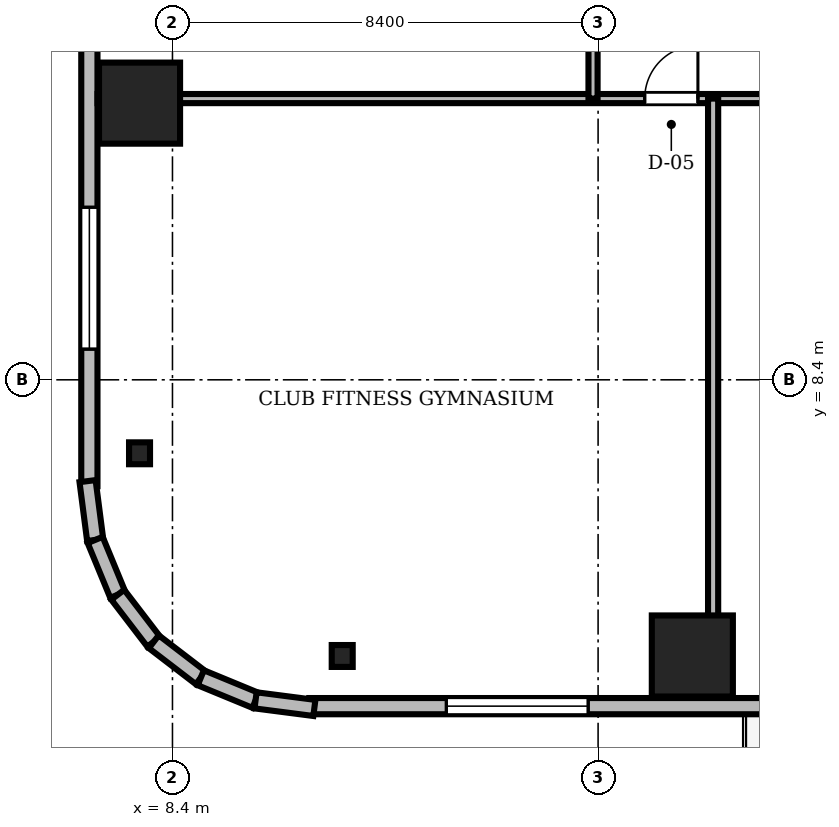
"""IFC4 building model, lengths in metres.
Left out: names, types, materials, properties, quantities, classifications, styles, units other than length and angle.
Written with IfcOpenShell. Run it as: python <this file> out.ifc"""

import sys

from ifc_helpers import new_model, si_unit, direction, frame, frame_2d, origin, origin_2d, place, context, subcontext, project, spatial, rectangle, i_section, extrude, source, transform, mapped, element, fill, save


model = new_model("IFC4")
c1 = context("Model", 3, precision=1e-05, world=origin(), true_north=direction((0.0, 1.0)))
c2 = subcontext(c1, "Body", "Model", "MODEL_VIEW")
j1 = project(units=[si_unit("LENGTHUNIT", "METRE"), si_unit("PLANEANGLEUNIT", "RADIAN")], contexts=[c1])
p1 = place(None, origin())
s1 = spatial("IfcSite", under=j1, at=p1, CompositionType="ELEMENT")
p2 = place(p1, origin())
s2 = spatial("IfcBuilding", under=s1, at=p2, CompositionType="ELEMENT")
p3 = place(p2, frame((0.0, 0.0, 155.7)))
s3 = spatial("IfcBuildingStorey", under=s2, at=p3, CompositionType="ELEMENT", Elevation=155.7)
m1 = source(origin(), c2, "Body", "SweptSolid", [
    extrude(rectangle(XDim=1.6, YDim=1.6, at=origin_2d()), origin(), (0.0, 0.0, 1.0), 3.46),
])
for number, where, z_axis, x_axis in (
    (1, (18.66, 2.95, 0.0), (0.0, 0.0, 1.0), (1.0, 0.0, 0.0)),
    (2, (7.75, 13.86, 0.0), (0.0, 0.0, 1.0), (1.0, 0.0, 0.0)),
):
    element("IfcColumn", number, at=place(p3, frame(where, z_axis=z_axis, x_axis=x_axis)), inside=s3, PredefinedType="COLUMN", context=c2, shape_type="MappedRepresentation", body=[
        mapped(m1, transform((0.0, 0.0, 0.0), scale=1.0)),
    ])
m2 = source(origin(), c2, "Body", "SweptSolid", [
    extrude(i_section(OverallWidth=0.414, OverallDepth=0.432, WebThickness=0.026, FlangeThickness=0.04, FilletRadius=0.015, at=origin_2d()), origin(), (0.0, 0.0, 1.0), 3.46),
])
for number, where, z_axis, x_axis in (
    (3, (11.75, 2.95, 0.0), (0.0, 0.0, 1.0), (1.0, 0.0, 0.0)),
    (4, (7.75, 6.95, 0.0), (0.0, 0.0, 1.0), (1.0, 0.0, 0.0)),
):
    element("IfcColumn", number, at=place(p3, frame(where, z_axis=z_axis, x_axis=x_axis)), inside=s3, PredefinedType="COLUMN", context=c2, shape_type="MappedRepresentation", body=[
        mapped(m2, transform((0.0, 0.0, 0.0), scale=1.0)),
    ])
m3 = source(origin(), c2, "Body", "SweptSolid", [
    extrude(rectangle(XDim=15.6, YDim=0.32, at=frame_2d((7.8, 0.0))), origin(), (0.0, 0.0, 1.0), 3.46),
])
p4 = place(p3, frame((11.1, 1.96, 0.0), z_axis=(0.0, 0.0, 1.0), x_axis=(1.0, 0.0, 0.0)))
e5 = element("IfcWall", 5, at=p4, inside=s3, PredefinedType="SOLIDWALL", context=c2, shape_type="MappedRepresentation", body=[
    mapped(m3, transform((0.0, 0.0, 0.0), scale=1.0)),
])
m4 = source(origin(), c2, "Body", "SweptSolid", [
    extrude(rectangle(XDim=1.4, YDim=2.3, at=frame_2d((0.7, 1.15))), frame((0.0, 0.17, 0.0), z_axis=(0.0, -1.0, 0.0), x_axis=(1.0, 0.0, 0.0)), (0.0, 0.0, 1.0), 0.34),
])
p5 = place(p4, frame((9.61, 0.0, 0.0)))
e6 = element("IfcOpeningElement", 6, at=p5, cuts=e5, PredefinedType="OPENING", context=c2, shape_type="MappedRepresentation", body=[
    mapped(m4, transform((0.0, 0.0, 0.0), scale=1.0)),
])
m5 = source(origin(), c2, "Body", "SweptSolid", [
    extrude(rectangle(XDim=2.8, YDim=2.4, at=frame_2d((1.4, 1.2))), frame((0.0, 0.17, 0.0), z_axis=(0.0, -1.0, 0.0), x_axis=(1.0, 0.0, 0.0)), (0.0, 0.0, 1.0), 0.34),
])
p6 = place(p4, frame((2.705, 0.0, 0.72)))
e7 = element("IfcOpeningElement", 7, at=p6, cuts=e5, PredefinedType="OPENING", context=c2, shape_type="MappedRepresentation", body=[
    mapped(m5, transform((0.0, 0.0, 0.0), scale=1.0)),
])
p7 = place(p3, frame((6.76, 21.9, 0.0), z_axis=(0.0, 0.0, 1.0), x_axis=(0.0, -1.0, 0.0)))
e8 = element("IfcWall", 8, at=p7, inside=s3, PredefinedType="SOLIDWALL", context=c2, shape_type="MappedRepresentation", body=[
    mapped(m3, transform((0.0, 0.0, 0.0), scale=1.0)),
])
p8 = place(p7, frame((10.095, 0.0, 0.72)))
e9 = element("IfcOpeningElement", 9, at=p8, cuts=e8, PredefinedType="OPENING", context=c2, shape_type="MappedRepresentation", body=[
    mapped(m5, transform((0.0, 0.0, 0.0), scale=1.0)),
])
m6 = source(origin(), c2, "Body", "SweptSolid", [
    extrude(rectangle(XDim=1.171, YDim=0.32, at=frame_2d((0.585, 0.0))), origin(), (0.0, 0.0, 1.0), 3.46),
])
p9 = place(p3, frame((6.724, 6.401, 0.0), z_axis=(0.0, 0.0, 1.0), x_axis=(0.128269133229, -0.991739395941, 0.0)))
e10 = element("IfcWall", 10, at=p9, inside=s3, PredefinedType="SOLIDWALL", context=c2, shape_type="MappedRepresentation", body=[
    mapped(m6, transform((0.0, 0.0, 0.0), scale=1.0)),
])
m7 = source(origin(), c2, "Body", "SweptSolid", [
    extrude(rectangle(XDim=1.169, YDim=0.32, at=frame_2d((0.584, 0.0))), origin(), (0.0, 0.0, 1.0), 3.46),
])
for number, where, z_axis, x_axis in (
    (11, (6.875, 5.24, 0.0), (0.0, 0.0, 1.0), (0.381, -0.925, 0.0)),
    (12, (7.32, 4.159, 0.0), (0.0, 0.0, 1.0), (0.608, -0.794, 0.0)),
):
    element("IfcWall", number, at=place(p3, frame(where, z_axis=z_axis, x_axis=x_axis)), inside=s3, PredefinedType="SOLIDWALL", context=c2, shape_type="MappedRepresentation", body=[
        mapped(m7, transform((0.0, 0.0, 0.0), scale=1.0)),
    ])
m8 = source(origin(), c2, "Body", "SweptSolid", [
    extrude(rectangle(XDim=1.169, YDim=0.32, at=frame_2d((0.584, 0.0))), origin(), (0.0, 0.0, 1.0), 3.46),
])
p10 = place(p3, frame((8.031, 3.231, 0.0), z_axis=(0.0, 0.0, 1.0), x_axis=(0.793663520347, -0.608356981114, 0.0)))
e13 = element("IfcWall", 13, at=p10, inside=s3, PredefinedType="SOLIDWALL", context=c2, shape_type="MappedRepresentation", body=[
    mapped(m8, transform((0.0, 0.0, 0.0), scale=1.0)),
])
m9 = source(origin(), c2, "Body", "SweptSolid", [
    extrude(rectangle(XDim=1.169, YDim=0.32, at=frame_2d((0.585, 0.0))), origin(), (0.0, 0.0, 1.0), 3.46),
])
p11 = place(p3, frame((8.959, 2.52, 0.0), z_axis=(0.0, 0.0, 1.0), x_axis=(0.924479075121, -0.381232789334, 0.0)))
e14 = element("IfcWall", 14, at=p11, inside=s3, PredefinedType="SOLIDWALL", context=c2, shape_type="MappedRepresentation", body=[
    mapped(m9, transform((0.0, 0.0, 0.0), scale=1.0)),
])
m10 = source(origin(), c2, "Body", "SweptSolid", [
    extrude(rectangle(XDim=1.17, YDim=0.32, at=frame_2d((0.585, 0.0))), origin(), (0.0, 0.0, 1.0), 3.46),
])
p12 = place(p3, frame((10.04, 2.074, 0.0), z_axis=(0.0, 0.0, 1.0), x_axis=(0.991762485493, -0.128090485085, 0.0)))
e15 = element("IfcWall", 15, at=p12, inside=s3, PredefinedType="SOLIDWALL", context=c2, shape_type="MappedRepresentation", body=[
    mapped(m10, transform((0.0, 0.0, 0.0), scale=1.0)),
])
m11 = source(origin(), c2, "Body", "SweptSolid", [
    extrude(rectangle(XDim=46.156, YDim=0.18, at=frame_2d((23.078, 0.0))), origin(), (0.0, 0.0, 1.0), 2.702),
])
p13 = place(p3, frame((6.922, 13.95, 0.0), z_axis=(0.0, 0.0, 1.0), x_axis=(1.0, 0.0, 0.0)))
e16 = element("IfcWall", 16, at=p13, inside=s3, PredefinedType="PARTITIONING", context=c2, shape_type="MappedRepresentation", body=[
    mapped(m11, transform((0.0, 0.0, 0.0), scale=1.0)),
])
m12 = source(origin(), c2, "Body", "SweptSolid", [
    extrude(rectangle(XDim=1.05, YDim=2.2, at=frame_2d((0.525, 1.1))), frame((0.0, 0.1, 0.0), z_axis=(0.0, -1.0, 0.0), x_axis=(1.0, 0.0, 0.0)), (0.0, 0.0, 1.0), 0.2),
])
p14 = place(p13, frame((10.798, 0.0, 0.0)))
e17 = element("IfcOpeningElement", 17, at=p14, cuts=e16, PredefinedType="OPENING", context=c2, shape_type="MappedRepresentation", body=[
    mapped(m12, transform((0.0, 0.0, 0.0), scale=1.0)),
])
p15 = place(p13, frame((13.398, 0.0, 0.0)))
e18 = element("IfcOpeningElement", 18, at=p15, cuts=e16, PredefinedType="OPENING", context=c2, shape_type="MappedRepresentation", body=[
    mapped(m12, transform((0.0, 0.0, 0.0), scale=1.0)),
])
p16 = place(p13, frame((17.351, 0.0, 0.0)))
e19 = element("IfcOpeningElement", 19, at=p16, cuts=e16, PredefinedType="OPENING", context=c2, shape_type="MappedRepresentation", body=[
    mapped(m12, transform((0.0, 0.0, 0.0), scale=1.0)),
])
p17 = place(p13, frame((21.885, 0.0, 0.0)))
e20 = element("IfcOpeningElement", 20, at=p17, cuts=e16, PredefinedType="OPENING", context=c2, shape_type="MappedRepresentation", body=[
    mapped(m12, transform((0.0, 0.0, 0.0), scale=1.0)),
])
p18 = place(p13, frame((26.588, 0.0, 0.0)))
e21 = element("IfcOpeningElement", 21, at=p18, cuts=e16, PredefinedType="OPENING", context=c2, shape_type="MappedRepresentation", body=[
    mapped(m12, transform((0.0, 0.0, 0.0), scale=1.0)),
])
m13 = source(origin(), c2, "Body", "SweptSolid", [
    extrude(rectangle(XDim=0.95, YDim=2.15, at=frame_2d((0.475, 1.075))), frame((0.0, 0.1, 0.0), z_axis=(0.0, -1.0, 0.0), x_axis=(1.0, 0.0, 0.0)), (0.0, 0.0, 1.0), 0.2),
])
p19 = place(p13, frame((32.516, 0.0, 0.0)))
e22 = element("IfcOpeningElement", 22, at=p19, cuts=e16, PredefinedType="OPENING", context=c2, shape_type="MappedRepresentation", body=[
    mapped(m13, transform((0.0, 0.0, 0.0), scale=1.0)),
])
p20 = place(p13, frame((36.744, 0.0, 0.0)))
e23 = element("IfcOpeningElement", 23, at=p20, cuts=e16, PredefinedType="OPENING", context=c2, shape_type="MappedRepresentation", body=[
    mapped(m12, transform((0.0, 0.0, 0.0), scale=1.0)),
])
p21 = place(p13, frame((41.828, 0.0, 0.0)))
e24 = element("IfcOpeningElement", 24, at=p21, cuts=e16, PredefinedType="OPENING", context=c2, shape_type="MappedRepresentation", body=[
    mapped(m12, transform((0.0, 0.0, 0.0), scale=1.0)),
])
m14 = source(origin(), c2, "Body", "SweptSolid", [
    extrude(rectangle(XDim=14.6, YDim=0.18, at=frame_2d((7.3, 0.0))), origin(), (0.0, 0.0, 1.0), 2.852),
])
p22 = place(p3, frame((16.7, 13.95, 0.0), z_axis=(0.0, 0.0, 1.0), x_axis=(0.0, 1.0, 0.0)))
e25 = element("IfcWall", 25, at=p22, inside=s3, PredefinedType="PARTITIONING", context=c2, shape_type="MappedRepresentation", body=[
    mapped(m14, transform((0.0, 0.0, 0.0), scale=1.0)),
])
p23 = place(p22, frame((1.888, 0.0, 0.0)))
e26 = element("IfcOpeningElement", 26, at=p23, cuts=e25, PredefinedType="OPENING", context=c2, shape_type="MappedRepresentation", body=[
    mapped(m12, transform((0.0, 0.0, 0.0), scale=1.0)),
])
p24 = place(p22, frame((7.93, 0.0, 0.0)))
e27 = element("IfcOpeningElement", 27, at=p24, cuts=e25, PredefinedType="OPENING", context=c2, shape_type="MappedRepresentation", body=[
    mapped(m13, transform((0.0, 0.0, 0.0), scale=1.0)),
])
p25 = place(p22, frame((12.747, 0.0, 0.0)))
e28 = element("IfcOpeningElement", 28, at=p25, cuts=e25, PredefinedType="OPENING", context=c2, shape_type="MappedRepresentation", body=[
    mapped(m13, transform((0.0, 0.0, 0.0), scale=1.0)),
])
m15 = source(origin(), c2, "Body", "SweptSolid", [
    extrude(rectangle(XDim=11.828, YDim=0.2, at=frame_2d((5.914, 0.0))), origin(), (0.0, 0.0, 1.0), 2.702),
])
p26 = place(p3, frame((19.07, 2.122, 0.0), z_axis=(0.0, 0.0, 1.0), x_axis=(0.0, 1.0, 0.0)))
e29 = element("IfcWall", 29, at=p26, inside=s3, PredefinedType="PARTITIONING", context=c2, shape_type="MappedRepresentation", body=[
    mapped(m15, transform((0.0, 0.0, 0.0), scale=1.0)),
])
m16 = source(origin(), c2, "Body", "SweptSolid", [
    extrude(rectangle(XDim=2.8, YDim=2.4, at=frame_2d((1.4, 1.2))), frame((0.0, 0.03, 0.0), z_axis=(0.0, -1.0, 0.0), x_axis=(1.0, 0.0, 0.0)), (0.0, 0.0, 1.0), 0.06),
])
p27 = place(p6, origin())
e30 = element("IfcWindow", 30, at=p27, inside=s3, PartitioningType="SINGLE_PANEL", PredefinedType="WINDOW", context=c2, shape_type="MappedRepresentation", body=[
    mapped(m16, transform((0.0, 0.0, 0.0), scale=1.0)),
])
fill(e7, e30)
p28 = place(p8, origin())
e31 = element("IfcWindow", 31, at=p28, inside=s3, PartitioningType="SINGLE_PANEL", PredefinedType="WINDOW", context=c2, shape_type="MappedRepresentation", body=[
    mapped(m16, transform((0.0, 0.0, 0.0), scale=1.0)),
])
fill(e9, e31)
m17 = source(origin(), c2, "Body", "SweptSolid", [
    extrude(rectangle(XDim=1.05, YDim=2.2, at=frame_2d((0.525, 1.1))), frame((0.0, 0.025, 0.0), z_axis=(0.0, -1.0, 0.0), x_axis=(1.0, 0.0, 0.0)), (0.0, 0.0, 1.0), 0.05),
])
p29 = place(p14, origin())
e32 = element("IfcDoor", 32, at=p29, inside=s3, OperationType="SINGLE_SWING_RIGHT", PredefinedType="DOOR", context=c2, shape_type="MappedRepresentation", body=[
    mapped(m17, transform((0.0, 0.0, 0.0), scale=1.0)),
])
fill(e17, e32)
save(model, sys.argv[1])
